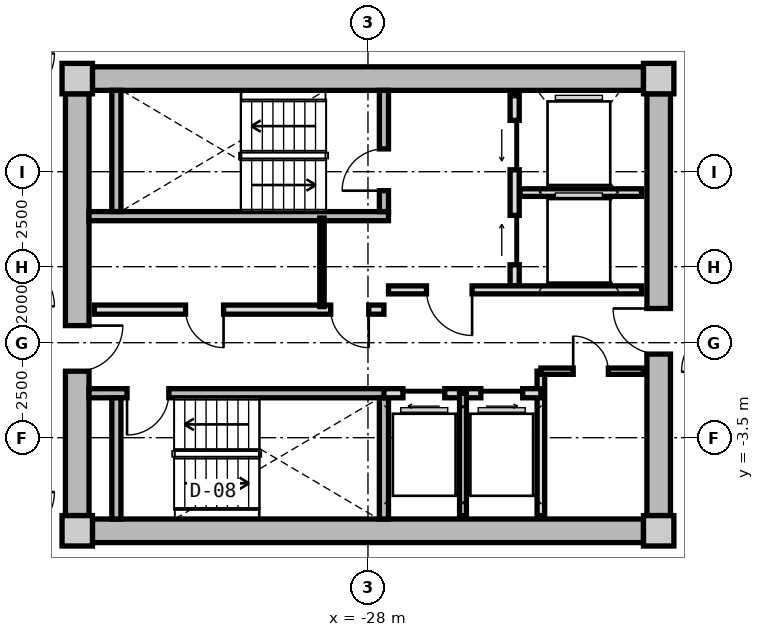
"""IFC4 building model, lengths in metres.
Left out: names, types, materials, properties, quantities, classifications, styles, units other than length and angle.
Written with IfcOpenShell. Run it as: python <this file> out.ifc"""

import sys

from ifc_helpers import new_model, si_unit, direction, frame, frame_2d, origin, origin_2d, place, context, subcontext, project, spatial, rectangle, extrude, source, transform, mapped, element, fill, save


model = new_model("IFC4")
c1 = context("Model", 3, precision=1e-05, world=origin(), true_north=direction((0.0, 1.0)))
c2 = subcontext(c1, "Body", "Model", "MODEL_VIEW")
j1 = project(units=[si_unit("LENGTHUNIT", "METRE"), si_unit("PLANEANGLEUNIT", "RADIAN")], contexts=[c1])
p1 = place(None, origin())
s1 = spatial("IfcSite", under=j1, at=p1, CompositionType="ELEMENT")
p2 = place(p1, origin())
s2 = spatial("IfcBuilding", under=s1, at=p2, CompositionType="ELEMENT")
p3 = place(p2, frame((0.0, 0.0, 155.65)))
s3 = spatial("IfcBuildingStorey", under=s2, at=p3, CompositionType="ELEMENT", Elevation=155.65)
m1 = source(origin(), c2, "Body", "SweptSolid", [
    extrude(rectangle(XDim=0.8, YDim=0.8, at=origin_2d()), origin(), (0.0, 0.0, 1.0), 3.05),
])
for number, where, z_axis, x_axis in (
    (1, (-35.65, -5.95, 0.0), (0.0, 0.0, 1.0), (1.0, 0.0, 0.0)),
    (2, (-20.35, -5.95, 0.0), (0.0, 0.0, 1.0), (1.0, 0.0, 0.0)),
    (3, (-20.35, 5.95, 0.0), (0.0, 0.0, 1.0), (1.0, 0.0, 0.0)),
    (4, (-35.65, 5.95, 0.0), (0.0, 0.0, 1.0), (1.0, 0.0, 0.0)),
):
    element("IfcColumn", number, at=place(p3, frame(where, z_axis=z_axis, x_axis=x_axis)), inside=s3, PredefinedType="COLUMN", context=c2, shape_type="MappedRepresentation", body=[
        mapped(m1, transform((0.0, 0.0, 0.0), x_axis=(1.0, 0.0, 0.0), y_axis=(0.0, 1.0, 0.0), z_axis=(0.0, 0.0, 1.0), scale=1.0)),
    ])
m2 = source(origin(), c2, "Body", "SweptSolid", [
    extrude(rectangle(XDim=14.5, YDim=0.62, at=frame_2d((7.25, 0.0))), origin(), (0.0, 0.0, 1.0), 2.81),
])
for number, where, z_axis, x_axis in (
    (5, (-35.25, 5.95, 0.0), (0.0, 0.0, 1.0), (1.0, 0.0, 0.0)),
    (6, (-20.75, -5.95, 0.0), (0.0, 0.0, 1.0), (-1.0, 0.0, 0.0)),
):
    element("IfcWall", number, at=place(p3, frame(where, z_axis=z_axis, x_axis=x_axis)), inside=s3, PredefinedType="SHEAR", context=c2, shape_type="MappedRepresentation", body=[
        mapped(m2, transform((0.0, 0.0, 0.0), x_axis=(1.0, 0.0, 0.0), y_axis=(0.0, 1.0, 0.0), z_axis=(0.0, 0.0, 1.0), scale=1.0)),
    ])
m3 = source(origin(), c2, "Body", "SweptSolid", [
    extrude(rectangle(XDim=11.1, YDim=0.62, at=frame_2d((5.55, 0.0))), origin(), (0.0, 0.0, 1.0), 2.81),
])
p4 = place(p3, frame((-35.65, -5.55, 0.0), z_axis=(0.0, 0.0, 1.0), x_axis=(0.0, 1.0, 0.0)))
e7 = element("IfcWall", 7, at=p4, inside=s3, PredefinedType="SHEAR", context=c2, shape_type="MappedRepresentation", body=[
    mapped(m3, transform((0.0, 0.0, 0.0), x_axis=(1.0, 0.0, 0.0), y_axis=(0.0, 1.0, 0.0), z_axis=(0.0, 0.0, 1.0), scale=1.0)),
])
p5 = place(p4, frame((3.8, 0.0, 0.0)))
e8 = element("IfcOpeningElement", 8, at=p5, cuts=e7, PredefinedType="OPENING", context=c2, shape_type="SweptSolid", body=[
    extrude(rectangle(XDim=1.2, YDim=2.15, at=frame_2d((0.6, 1.075))), frame((0.0, 0.32, 0.0), z_axis=(0.0, -1.0, 0.0), x_axis=(1.0, 0.0, 0.0)), (0.0, 0.0, 1.0), 0.64),
])
p6 = place(p3, frame((-20.35, 5.55, 0.0), z_axis=(0.0, 0.0, 1.0), x_axis=(0.0, -1.0, 0.0)))
e9 = element("IfcWall", 9, at=p6, inside=s3, PredefinedType="SHEAR", context=c2, shape_type="MappedRepresentation", body=[
    mapped(m3, transform((0.0, 0.0, 0.0), x_axis=(1.0, 0.0, 0.0), y_axis=(0.0, 1.0, 0.0), z_axis=(0.0, 0.0, 1.0), scale=1.0)),
])
p7 = place(p6, frame((5.65, 0.0, 0.0)))
e10 = element("IfcOpeningElement", 10, at=p7, cuts=e9, PredefinedType="OPENING", context=c2, shape_type="SweptSolid", body=[
    extrude(rectangle(XDim=1.2, YDim=2.15, at=frame_2d((0.6, 1.075))), frame((0.0, 0.32, 0.0), z_axis=(0.0, -1.0, 0.0), x_axis=(1.0, 0.0, 0.0)), (0.0, 0.0, 1.0), 0.64),
])
m4 = source(origin(), c2, "Body", "SweptSolid", [
    extrude(rectangle(XDim=7.88, YDim=0.24, at=frame_2d((3.94, 0.0))), origin(), (0.0, 0.0, 1.0), 2.81),
])
p8 = place(p3, frame((-35.34, 2.33, 0.0), z_axis=(0.0, 0.0, 1.0), x_axis=(1.0, 0.0, 0.0)))
e11 = element("IfcWall", 11, at=p8, inside=s3, PredefinedType="PARTITIONING", context=c2, shape_type="MappedRepresentation", body=[
    mapped(m4, transform((0.0, 0.0, 0.0), x_axis=(1.0, 0.0, 0.0), y_axis=(0.0, 1.0, 0.0), z_axis=(0.0, 0.0, 1.0), scale=1.0)),
])
m5 = source(origin(), c2, "Body", "SweptSolid", [
    extrude(rectangle(XDim=3.19, YDim=0.24, at=frame_2d((1.595, 0.0))), origin(), (0.0, 0.0, 1.0), 2.81),
])
p9 = place(p3, frame((-34.62, 2.45, 0.0), z_axis=(0.0, 0.0, 1.0), x_axis=(0.0, 1.0, 0.0)))
e12 = element("IfcWall", 12, at=p9, inside=s3, PredefinedType="PARTITIONING", context=c2, shape_type="MappedRepresentation", body=[
    mapped(m5, transform((0.0, 0.0, 0.0), x_axis=(1.0, 0.0, 0.0), y_axis=(0.0, 1.0, 0.0), z_axis=(0.0, 0.0, 1.0), scale=1.0)),
])
p10 = place(p3, frame((-27.58, 2.45, 0.0), z_axis=(0.0, 0.0, 1.0), x_axis=(0.0, 1.0, 0.0)))
e13 = element("IfcWall", 13, at=p10, inside=s3, PredefinedType="PARTITIONING", context=c2, shape_type="MappedRepresentation", body=[
    mapped(m5, transform((0.0, 0.0, 0.0), x_axis=(1.0, 0.0, 0.0), y_axis=(0.0, 1.0, 0.0), z_axis=(0.0, 0.0, 1.0), scale=1.0)),
])
p11 = place(p10, frame((0.55, 0.0, 0.0)))
e14 = element("IfcOpeningElement", 14, at=p11, cuts=e13, PredefinedType="OPENING", context=c2, shape_type="SweptSolid", body=[
    extrude(rectangle(XDim=1.1, YDim=2.15, at=frame_2d((0.55, 1.075))), frame((0.0, 0.13, 0.0), z_axis=(0.0, -1.0, 0.0), x_axis=(1.0, 0.0, 0.0)), (0.0, 0.0, 1.0), 0.26),
])
p12 = place(p3, frame((-35.34, -2.33, 0.0), z_axis=(0.0, 0.0, 1.0), x_axis=(1.0, 0.0, 0.0)))
e15 = element("IfcWall", 15, at=p12, inside=s3, PredefinedType="PARTITIONING", context=c2, shape_type="MappedRepresentation", body=[
    mapped(m4, transform((0.0, 0.0, 0.0), x_axis=(1.0, 0.0, 0.0), y_axis=(0.0, 1.0, 0.0), z_axis=(0.0, 0.0, 1.0), scale=1.0)),
])
p13 = place(p12, frame((1.0, 0.0, 0.0)))
e16 = element("IfcOpeningElement", 16, at=p13, cuts=e15, PredefinedType="OPENING", context=c2, shape_type="SweptSolid", body=[
    extrude(rectangle(XDim=1.1, YDim=2.15, at=frame_2d((0.55, 1.075))), frame((0.0, 0.13, 0.0), z_axis=(0.0, -1.0, 0.0), x_axis=(1.0, 0.0, 0.0)), (0.0, 0.0, 1.0), 0.26),
])
for number, where, z_axis, x_axis in (
    (17, (-34.62, -5.64, 0.0), (0.0, 0.0, 1.0), (0.0, 1.0, 0.0)),
    (18, (-27.58, -5.64, 0.0), (0.0, 0.0, 1.0), (0.0, 1.0, 0.0)),
):
    element("IfcWall", number, at=place(p3, frame(where, z_axis=z_axis, x_axis=x_axis)), inside=s3, PredefinedType="PARTITIONING", context=c2, shape_type="MappedRepresentation", body=[
        mapped(m5, transform((0.0, 0.0, 0.0), x_axis=(1.0, 0.0, 0.0), y_axis=(0.0, 1.0, 0.0), z_axis=(0.0, 0.0, 1.0), scale=1.0)),
    ])
m6 = source(origin(), c2, "Body", "SweptSolid", [
    extrude(rectangle(XDim=5.0, YDim=0.24, at=frame_2d((2.5, 0.0))), origin(), (0.0, 0.0, 1.0), 2.795),
])
p14 = place(p3, frame((-24.14, 0.5, 0.0), z_axis=(0.0, 0.0, 1.0), x_axis=(0.0, 1.0, 0.0)))
e19 = element("IfcWall", 19, at=p14, inside=s3, PredefinedType="PARTITIONING", context=c2, shape_type="MappedRepresentation", body=[
    mapped(m6, transform((0.0, 0.0, 0.0), x_axis=(1.0, 0.0, 0.0), y_axis=(0.0, 1.0, 0.0), z_axis=(0.0, 0.0, 1.0), scale=1.0)),
])
p15 = place(p14, frame((3.05, 0.0, 0.0)))
e20 = element("IfcOpeningElement", 20, at=p15, cuts=e19, PredefinedType="OPENING", context=c2, shape_type="SweptSolid", body=[
    extrude(rectangle(XDim=1.3, YDim=2.2, at=frame_2d((0.65, 1.1))), frame((0.0, 0.13, 0.0), z_axis=(0.0, -1.0, 0.0), x_axis=(1.0, 0.0, 0.0)), (0.0, 0.0, 1.0), 0.26),
])
p16 = place(p14, frame((0.55, 0.0, 0.0)))
e21 = element("IfcOpeningElement", 21, at=p16, cuts=e19, PredefinedType="OPENING", context=c2, shape_type="SweptSolid", body=[
    extrude(rectangle(XDim=1.3, YDim=2.2, at=frame_2d((0.65, 1.1))), frame((0.0, 0.13, 0.0), z_axis=(0.0, -1.0, 0.0), x_axis=(1.0, 0.0, 0.0)), (0.0, 0.0, 1.0), 0.26),
])
m7 = source(origin(), c2, "Body", "SweptSolid", [
    extrude(rectangle(XDim=3.2, YDim=0.2, at=frame_2d((1.6, 0.0))), origin(), (0.0, 0.0, 1.0), 2.795),
])
p17 = place(p3, frame((-24.0, 2.95, 0.0), z_axis=(0.0, 0.0, 1.0), x_axis=(1.0, 0.0, 0.0)))
e22 = element("IfcWall", 22, at=p17, inside=s3, PredefinedType="PARTITIONING", context=c2, shape_type="MappedRepresentation", body=[
    mapped(m7, transform((0.0, 0.0, 0.0), x_axis=(1.0, 0.0, 0.0), y_axis=(0.0, 1.0, 0.0), z_axis=(0.0, 0.0, 1.0), scale=1.0)),
])
m8 = source(origin(), c2, "Body", "SweptSolid", [
    extrude(rectangle(XDim=6.66, YDim=0.21, at=frame_2d((3.33, 0.0))), origin(), (0.0, 0.0, 1.0), 2.795),
])
p18 = place(p3, frame((-27.46, 0.39, 0.0), z_axis=(0.0, 0.0, 1.0), x_axis=(1.0, 0.0, 0.0)))
e23 = element("IfcWall", 23, at=p18, inside=s3, PredefinedType="PARTITIONING", context=c2, shape_type="MappedRepresentation", body=[
    mapped(m8, transform((0.0, 0.0, 0.0), x_axis=(1.0, 0.0, 0.0), y_axis=(0.0, 1.0, 0.0), z_axis=(0.0, 0.0, 1.0), scale=1.0)),
])
p19 = place(p18, frame((1.0, 0.0, 0.0)))
e24 = element("IfcOpeningElement", 24, at=p19, cuts=e23, PredefinedType="OPENING", context=c2, shape_type="SweptSolid", body=[
    extrude(rectangle(XDim=1.2, YDim=2.15, at=frame_2d((0.6, 1.075))), frame((0.0, 0.115, 0.0), z_axis=(0.0, -1.0, 0.0), x_axis=(1.0, 0.0, 0.0)), (0.0, 0.0, 1.0), 0.23),
])
m9 = source(origin(), c2, "Body", "SweptSolid", [
    extrude(rectangle(XDim=7.62, YDim=0.24, at=frame_2d((3.81, 0.0))), origin(), (0.0, 0.0, 1.0), 2.795),
])
p20 = place(p3, frame((-35.2, -0.13, 0.0), z_axis=(0.0, 0.0, 1.0), x_axis=(1.0, 0.0, 0.0)))
e25 = element("IfcWall", 25, at=p20, inside=s3, PredefinedType="PARTITIONING", context=c2, shape_type="MappedRepresentation", body=[
    mapped(m9, transform((0.0, 0.0, 0.0), x_axis=(1.0, 0.0, 0.0), y_axis=(0.0, 1.0, 0.0), z_axis=(0.0, 0.0, 1.0), scale=1.0)),
])
p21 = place(p20, frame((6.22, 0.0, 0.0)))
e26 = element("IfcOpeningElement", 26, at=p21, cuts=e25, PredefinedType="OPENING", context=c2, shape_type="SweptSolid", body=[
    extrude(rectangle(XDim=1.0, YDim=2.1, at=frame_2d((0.5, 1.05))), frame((0.0, 0.13, 0.0), z_axis=(0.0, -1.0, 0.0), x_axis=(1.0, 0.0, 0.0)), (0.0, 0.0, 1.0), 0.26),
])
p22 = place(p20, frame((2.4, 0.0, 0.0)))
e27 = element("IfcOpeningElement", 27, at=p22, cuts=e25, PredefinedType="OPENING", context=c2, shape_type="SweptSolid", body=[
    extrude(rectangle(XDim=1.0, YDim=2.1, at=frame_2d((0.5, 1.05))), frame((0.0, 0.13, 0.0), z_axis=(0.0, -1.0, 0.0), x_axis=(1.0, 0.0, 0.0)), (0.0, 0.0, 1.0), 0.26),
])
m10 = source(origin(), c2, "Body", "SweptSolid", [
    extrude(rectangle(XDim=2.33, YDim=0.115, at=frame_2d((1.165, 0.0))), origin(), (0.0, 0.0, 1.0), 2.795),
])
p23 = place(p3, frame((-29.21, -0.05, 0.0), z_axis=(0.0, 0.0, 1.0), x_axis=(0.0, 1.0, 0.0)))
e28 = element("IfcWall", 28, at=p23, inside=s3, PredefinedType="PARTITIONING", context=c2, shape_type="MappedRepresentation", body=[
    mapped(m10, transform((0.0, 0.0, 0.0), x_axis=(1.0, 0.0, 0.0), y_axis=(0.0, 1.0, 0.0), z_axis=(0.0, 0.0, 1.0), scale=1.0)),
])
m11 = source(origin(), c2, "Body", "SweptSolid", [
    extrude(rectangle(XDim=3.8, YDim=0.2, at=frame_2d((1.9, 0.0))), origin(), (0.0, 0.0, 1.0), 2.795),
])
p24 = place(p3, frame((-23.45, -5.55, 0.0), z_axis=(0.0, 0.0, 1.0), x_axis=(0.0, 1.0, 0.0)))
e29 = element("IfcWall", 29, at=p24, inside=s3, PredefinedType="PARTITIONING", context=c2, shape_type="MappedRepresentation", body=[
    mapped(m11, transform((0.0, 0.0, 0.0), x_axis=(1.0, 0.0, 0.0), y_axis=(0.0, 1.0, 0.0), z_axis=(0.0, 0.0, 1.0), scale=1.0)),
])
m12 = source(origin(), c2, "Body", "SweptSolid", [
    extrude(rectangle(XDim=4.13, YDim=0.24, at=frame_2d((2.065, 0.0))), origin(), (0.0, 0.0, 1.0), 2.795),
])
p25 = place(p3, frame((-27.58, -2.33, 0.0), z_axis=(0.0, 0.0, 1.0), x_axis=(1.0, 0.0, 0.0)))
e30 = element("IfcWall", 30, at=p25, inside=s3, PredefinedType="PARTITIONING", context=c2, shape_type="MappedRepresentation", body=[
    mapped(m12, transform((0.0, 0.0, 0.0), x_axis=(1.0, 0.0, 0.0), y_axis=(0.0, 1.0, 0.0), z_axis=(0.0, 0.0, 1.0), scale=1.0)),
])
p26 = place(p25, frame((0.5, 0.0, 0.0)))
e31 = element("IfcOpeningElement", 31, at=p26, cuts=e30, PredefinedType="OPENING", context=c2, shape_type="SweptSolid", body=[
    extrude(rectangle(XDim=1.1, YDim=2.2, at=frame_2d((0.55, 1.1))), frame((0.0, 0.13, 0.0), z_axis=(0.0, -1.0, 0.0), x_axis=(1.0, 0.0, 0.0)), (0.0, 0.0, 1.0), 0.26),
])
p27 = place(p25, frame((2.55, 0.0, 0.0)))
e32 = element("IfcOpeningElement", 32, at=p27, cuts=e30, PredefinedType="OPENING", context=c2, shape_type="SweptSolid", body=[
    extrude(rectangle(XDim=1.1, YDim=2.2, at=frame_2d((0.55, 1.1))), frame((0.0, 0.13, 0.0), z_axis=(0.0, -1.0, 0.0), x_axis=(1.0, 0.0, 0.0)), (0.0, 0.0, 1.0), 0.26),
])
m13 = source(origin(), c2, "Body", "SweptSolid", [
    extrude(rectangle(XDim=3.22, YDim=0.18, at=frame_2d((1.61, 0.0))), origin(), (0.0, 0.0, 1.0), 2.795),
])
p28 = place(p3, frame((-25.5, -5.55, 0.0), z_axis=(0.0, 0.0, 1.0), x_axis=(0.0, 1.0, 0.0)))
e33 = element("IfcWall", 33, at=p28, inside=s3, PredefinedType="PARTITIONING", context=c2, shape_type="MappedRepresentation", body=[
    mapped(m13, transform((0.0, 0.0, 0.0), x_axis=(1.0, 0.0, 0.0), y_axis=(0.0, 1.0, 0.0), z_axis=(0.0, 0.0, 1.0), scale=1.0)),
])
m14 = source(origin(), c2, "Body", "SweptSolid", [
    extrude(rectangle(XDim=2.7, YDim=0.165, at=frame_2d((1.35, 0.0))), origin(), (0.0, 0.0, 1.0), 2.795),
])
p29 = place(p3, frame((-23.45, -1.75, 0.0), z_axis=(0.0, 0.0, 1.0), x_axis=(1.0, 0.0, 0.0)))
e34 = element("IfcWall", 34, at=p29, inside=s3, PredefinedType="PARTITIONING", context=c2, shape_type="MappedRepresentation", body=[
    mapped(m14, transform((0.0, 0.0, 0.0), x_axis=(1.0, 0.0, 0.0), y_axis=(0.0, 1.0, 0.0), z_axis=(0.0, 0.0, 1.0), scale=1.0)),
])
p30 = place(p29, frame((0.85, 0.0, 0.0)))
e35 = element("IfcOpeningElement", 35, at=p30, cuts=e34, PredefinedType="OPENING", context=c2, shape_type="SweptSolid", body=[
    extrude(rectangle(XDim=0.925, YDim=2.1, at=frame_2d((0.462, 1.05))), frame((0.0, 0.093, 0.0), z_axis=(0.0, -1.0, 0.0), x_axis=(1.0, 0.0, 0.0)), (0.0, 0.0, 1.0), 0.185),
])
m15 = source(origin(), c2, "Body", "SweptSolid", [
    extrude(rectangle(XDim=1.1, YDim=2.15, at=frame_2d((0.55, 1.075))), frame((0.0, 0.025, 0.0), z_axis=(0.0, -1.0, 0.0), x_axis=(1.0, 0.0, 0.0)), (0.0, 0.0, 1.0), 0.05),
])
p31 = place(p11, origin())
e36 = element("IfcDoor", 36, at=p31, inside=s3, OperationType="SINGLE_SWING_LEFT", PredefinedType="DOOR", context=c2, shape_type="MappedRepresentation", body=[
    mapped(m15, transform((0.0, 0.0, 0.0), x_axis=(1.0, 0.0, 0.0), y_axis=(0.0, 1.0, 0.0), z_axis=(0.0, 0.0, 1.0), scale=1.0)),
])
fill(e14, e36)
p32 = place(p13, frame((1.1, 0.0, 0.0), z_axis=(0.0, 0.0, 1.0), x_axis=(-1.0, 0.0, 0.0)))
e37 = element("IfcDoor", 37, at=p32, inside=s3, OperationType="SINGLE_SWING_RIGHT", PredefinedType="DOOR", context=c2, shape_type="MappedRepresentation", body=[
    mapped(m15, transform((0.0, 0.0, 0.0), x_axis=(1.0, 0.0, 0.0), y_axis=(0.0, 1.0, 0.0), z_axis=(0.0, 0.0, 1.0), scale=1.0)),
])
fill(e16, e37)
m16 = source(origin(), c2, "Body", "SweptSolid", [
    extrude(rectangle(XDim=1.3, YDim=2.2, at=frame_2d((0.65, 1.1))), frame((0.0, 0.025, 0.0), z_axis=(0.0, -1.0, 0.0), x_axis=(1.0, 0.0, 0.0)), (0.0, 0.0, 1.0), 0.05),
])
p33 = place(p15, origin())
e38 = element("IfcDoor", 38, at=p33, inside=s3, OperationType="SLIDING_TO_LEFT", PredefinedType="DOOR", context=c2, shape_type="MappedRepresentation", body=[
    mapped(m16, transform((0.0, 0.0, 0.0), x_axis=(1.0, 0.0, 0.0), y_axis=(0.0, 1.0, 0.0), z_axis=(0.0, 0.0, 1.0), scale=1.0)),
])
fill(e20, e38)
p34 = place(p16, origin())
e39 = element("IfcDoor", 39, at=p34, inside=s3, OperationType="SLIDING_TO_RIGHT", PredefinedType="DOOR", context=c2, shape_type="MappedRepresentation", body=[
    mapped(m16, transform((0.0, 0.0, 0.0), x_axis=(1.0, 0.0, 0.0), y_axis=(0.0, 1.0, 0.0), z_axis=(0.0, 0.0, 1.0), scale=1.0)),
])
fill(e21, e39)
m17 = source(origin(), c2, "Body", "SweptSolid", [
    extrude(rectangle(XDim=1.2, YDim=2.15, at=frame_2d((0.6, 1.075))), frame((0.0, 0.025, 0.0), z_axis=(0.0, -1.0, 0.0), x_axis=(1.0, 0.0, 0.0)), (0.0, 0.0, 1.0), 0.05),
])
p35 = place(p19, frame((1.2, 0.0, 0.0), z_axis=(0.0, 0.0, 1.0), x_axis=(-1.0, 0.0, 0.0)))
e40 = element("IfcDoor", 40, at=p35, inside=s3, OperationType="SINGLE_SWING_LEFT", PredefinedType="DOOR", context=c2, shape_type="MappedRepresentation", body=[
    mapped(m17, transform((0.0, 0.0, 0.0), x_axis=(1.0, 0.0, 0.0), y_axis=(0.0, 1.0, 0.0), z_axis=(0.0, 0.0, 1.0), scale=1.0)),
])
fill(e24, e40)
p36 = place(p5, frame((1.2, 0.0, 0.0), z_axis=(0.0, 0.0, 1.0), x_axis=(-1.0, 0.0, 0.0)))
e41 = element("IfcDoor", 41, at=p36, inside=s3, OperationType="SINGLE_SWING_LEFT", PredefinedType="DOOR", context=c2, shape_type="MappedRepresentation", body=[
    mapped(m17, transform((0.0, 0.0, 0.0), x_axis=(1.0, 0.0, 0.0), y_axis=(0.0, 1.0, 0.0), z_axis=(0.0, 0.0, 1.0), scale=1.0)),
])
fill(e8, e41)
p37 = place(p7, frame((1.2, 0.0, 0.0), z_axis=(0.0, 0.0, 1.0), x_axis=(-1.0, 0.0, 0.0)))
e42 = element("IfcDoor", 42, at=p37, inside=s3, OperationType="SINGLE_SWING_RIGHT", PredefinedType="DOOR", context=c2, shape_type="MappedRepresentation", body=[
    mapped(m17, transform((0.0, 0.0, 0.0), x_axis=(1.0, 0.0, 0.0), y_axis=(0.0, 1.0, 0.0), z_axis=(0.0, 0.0, 1.0), scale=1.0)),
])
fill(e10, e42)
m18 = source(origin(), c2, "Body", "SweptSolid", [
    extrude(rectangle(XDim=1.0, YDim=2.1, at=frame_2d((0.5, 1.05))), frame((0.0, 0.025, 0.0), z_axis=(0.0, -1.0, 0.0), x_axis=(1.0, 0.0, 0.0)), (0.0, 0.0, 1.0), 0.05),
])
p38 = place(p21, frame((1.0, 0.0, 0.0), z_axis=(0.0, 0.0, 1.0), x_axis=(-1.0, 0.0, 0.0)))
e43 = element("IfcDoor", 43, at=p38, inside=s3, OperationType="SINGLE_SWING_LEFT", PredefinedType="DOOR", context=c2, shape_type="MappedRepresentation", body=[
    mapped(m18, transform((0.0, 0.0, 0.0), x_axis=(1.0, 0.0, 0.0), y_axis=(0.0, 1.0, 0.0), z_axis=(0.0, 0.0, 1.0), scale=1.0)),
])
fill(e26, e43)
p39 = place(p22, frame((1.0, 0.0, 0.0), z_axis=(0.0, 0.0, 1.0), x_axis=(-1.0, 0.0, 0.0)))
e44 = element("IfcDoor", 44, at=p39, inside=s3, OperationType="SINGLE_SWING_LEFT", PredefinedType="DOOR", context=c2, shape_type="MappedRepresentation", body=[
    mapped(m18, transform((0.0, 0.0, 0.0), x_axis=(1.0, 0.0, 0.0), y_axis=(0.0, 1.0, 0.0), z_axis=(0.0, 0.0, 1.0), scale=1.0)),
])
fill(e27, e44)
m19 = source(origin(), c2, "Body", "SweptSolid", [
    extrude(rectangle(XDim=1.1, YDim=2.2, at=frame_2d((0.55, 1.1))), frame((0.0, 0.025, 0.0), z_axis=(0.0, -1.0, 0.0), x_axis=(1.0, 0.0, 0.0)), (0.0, 0.0, 1.0), 0.05),
])
p40 = place(p26, frame((1.1, 0.0, 0.0), z_axis=(0.0, 0.0, 1.0), x_axis=(-1.0, 0.0, 0.0)))
e45 = element("IfcDoor", 45, at=p40, inside=s3, OperationType="SLIDING_TO_LEFT", PredefinedType="DOOR", context=c2, shape_type="MappedRepresentation", body=[
    mapped(m19, transform((0.0, 0.0, 0.0), x_axis=(1.0, 0.0, 0.0), y_axis=(0.0, 1.0, 0.0), z_axis=(0.0, 0.0, 1.0), scale=1.0)),
])
fill(e31, e45)
p41 = place(p27, frame((1.1, 0.0, 0.0), z_axis=(0.0, 0.0, 1.0), x_axis=(-1.0, 0.0, 0.0)))
e46 = element("IfcDoor", 46, at=p41, inside=s3, OperationType="SLIDING_TO_RIGHT", PredefinedType="DOOR", context=c2, shape_type="MappedRepresentation", body=[
    mapped(m19, transform((0.0, 0.0, 0.0), x_axis=(1.0, 0.0, 0.0), y_axis=(0.0, 1.0, 0.0), z_axis=(0.0, 0.0, 1.0), scale=1.0)),
])
fill(e32, e46)
m20 = source(origin(), c2, "Body", "SweptSolid", [
    extrude(rectangle(XDim=0.925, YDim=2.1, at=frame_2d((0.462, 1.05))), frame((0.0, 0.025, 0.0), z_axis=(0.0, -1.0, 0.0), x_axis=(1.0, 0.0, 0.0)), (0.0, 0.0, 1.0), 0.05),
])
p42 = place(p30, origin())
e47 = element("IfcDoor", 47, at=p42, inside=s3, OperationType="SINGLE_SWING_LEFT", PredefinedType="DOOR", context=c2, shape_type="MappedRepresentation", body=[
    mapped(m20, transform((0.0, 0.0, 0.0), x_axis=(1.0, 0.0, 0.0), y_axis=(0.0, 1.0, 0.0), z_axis=(0.0, 0.0, 1.0), scale=1.0)),
])
fill(e35, e47)
save(model, sys.argv[1])
